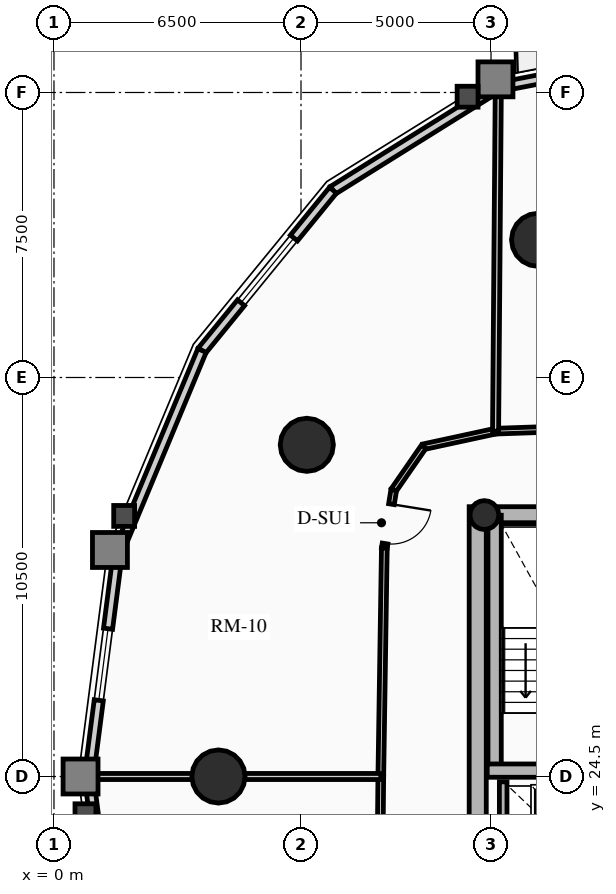
"""IFC4 building model, lengths in metres.
Left out: names, types, materials, properties, quantities, classifications, styles, units other than length and angle.
Written with IfcOpenShell. Run it as: python <this file> out.ifc"""

import sys

from ifc_helpers import new_model, si_unit, direction, frame, frame_2d, origin, origin_2d, place, context, subcontext, project, spatial, rectangle, circle, hollow_circle, extrude, source, transform, mapped, element, fill, save


model = new_model("IFC4")
c1 = context("Model", 3, precision=1e-05, world=origin(), true_north=direction((0.0, 1.0)))
c2 = subcontext(c1, "Body", "Model", "MODEL_VIEW")
j1 = project(units=[si_unit("LENGTHUNIT", "METRE"), si_unit("PLANEANGLEUNIT", "RADIAN")], contexts=[c1])
p1 = place(None, origin())
s1 = spatial("IfcSite", under=j1, at=p1, CompositionType="ELEMENT")
p2 = place(p1, origin())
s2 = spatial("IfcBuilding", under=s1, at=p2, CompositionType="ELEMENT")
p3 = place(p2, frame((0.0, 0.0, 75.97)))
s3 = spatial("IfcBuildingStorey", under=s2, at=p3, CompositionType="ELEMENT", Elevation=75.97)
p4 = place(p3, frame((11.15, 17.4, 0.0), z_axis=(0.0, 0.0, 1.0), x_axis=(0.0, 1.0, 0.0)))
e1 = element("IfcWall", 1, at=p4, inside=s3, PredefinedType="SHEAR", context=c2, shape_type="SweptSolid", body=[
    extrude(rectangle(XDim=14.2, YDim=0.45, at=frame_2d((7.1, 0.0))), origin(), (0.0, 0.0, 1.0), 2.91),
])
p5 = place(p3, frame((11.15, 31.375, 0.0), z_axis=(0.0, 0.0, 1.0), x_axis=(1.0, 0.0, 0.0)))
e2 = element("IfcWall", 2, at=p5, inside=s3, PredefinedType="SHEAR", context=c2, shape_type="SweptSolid", body=[
    extrude(rectangle(XDim=10.7, YDim=0.45, at=frame_2d((5.35, 0.0))), origin(), (0.0, 0.0, 1.0), 2.91),
])
m1 = source(origin(), c2, "Body", "SweptSolid", [
    extrude(rectangle(XDim=1.5, YDim=2.02, at=frame_2d((0.75, 1.01))), frame((0.0, 0.235, 0.0), z_axis=(0.0, -1.0, 0.0), x_axis=(1.0, 0.0, 0.0)), (0.0, 0.0, 1.0), 0.47),
])
p6 = place(p5, frame((4.6, 0.0, 0.0)))
e3 = element("IfcOpeningElement", 3, at=p6, cuts=e2, PredefinedType="OPENING", context=c2, shape_type="MappedRepresentation", body=[
    mapped(m1, transform((0.0, 0.0, 0.0), x_axis=(1.0, 0.0, 0.0), y_axis=(0.0, 1.0, 0.0), z_axis=(0.0, 0.0, 1.0), scale=1.0)),
])
p7 = place(p3, frame((11.595, 24.655, 0.0), z_axis=(0.0, 0.0, 1.0), x_axis=(0.0, 1.0, 0.0)))
e4 = element("IfcWall", 4, at=p7, inside=s3, PredefinedType="SHEAR", context=c2, shape_type="SweptSolid", body=[
    extrude(rectangle(XDim=6.72, YDim=0.35, at=frame_2d((3.36, 0.0))), origin(), (0.0, 0.0, 1.0), 2.91),
])
p8 = place(p3, frame((11.4, 24.655, 0.0), z_axis=(0.0, 0.0, 1.0), x_axis=(1.0, 0.0, 0.0)))
e5 = element("IfcWall", 5, at=p8, inside=s3, PredefinedType="SHEAR", context=c2, shape_type="SweptSolid", body=[
    extrude(rectangle(XDim=3.285, YDim=0.35, at=frame_2d((1.643, 0.0))), origin(), (0.0, 0.0, 1.0), 2.91),
])
p9 = place(p3, frame((11.325, 31.38, 0.0), z_axis=(0.0, 0.0, 1.0), x_axis=(1.0, 0.0, 0.0)))
e6 = element("IfcColumn", 6, at=p9, inside=s3, PredefinedType="COLUMN", context=c2, shape_type="SweptSolid", body=[
    extrude(hollow_circle(Radius=0.38, WallThickness=0.032, at=origin_2d()), origin(), (0.0, 0.0, 1.0), 2.91),
])
for number, where, z_axis, x_axis in (
    (7, (12.739, 38.623, 0.0), (0.0, 0.0, 1.0), (1.0, 0.0, 0.0)),
    (8, (6.653, 33.229, 0.0), (0.0, 0.0, 1.0), (1.0, 0.0, 0.0)),
    (9, (4.328, 24.5, 0.0), (0.0, 0.0, 1.0), (1.0, 0.0, 0.0)),
):
    element("IfcColumn", number, at=place(p3, frame(where, z_axis=z_axis, x_axis=x_axis)), inside=s3, PredefinedType="USERDEFINED", context=c2, shape_type="SweptSolid", body=[
        extrude(circle(Radius=0.7, at=origin_2d()), origin(), (0.0, 0.0, 1.0), 2.91),
    ])
p10 = place(p3, frame((11.685, 42.637, 0.0), z_axis=(0.0, 0.0, 1.0), x_axis=(0.981723785992, 0.190311344954, 0.0)))
e10 = element("IfcWall", 10, at=p10, inside=s3, PredefinedType="SOLIDWALL", context=c2, shape_type="SweptSolid", body=[
    extrude(rectangle(XDim=4.904, YDim=0.24, at=frame_2d((2.452, 0.0))), origin(), (0.0, 0.0, 1.0), 2.179),
])
m2 = source(origin(), c2, "Body", "SweptSolid", [
    extrude(rectangle(XDim=1.15, YDim=2.005, at=frame_2d((0.575, 1.002))), frame((0.0, 0.13, 0.0), z_axis=(0.0, -1.0, 0.0), x_axis=(1.0, 0.0, 0.0)), (0.0, 0.0, 1.0), 0.26),
])
p11 = place(p10, frame((1.877, 0.0, 0.0)))
e11 = element("IfcOpeningElement", 11, at=p11, cuts=e10, PredefinedType="OPENING", context=c2, shape_type="MappedRepresentation", body=[
    mapped(m2, transform((0.0, 0.0, 0.0), x_axis=(1.0, 0.0, 0.0), y_axis=(0.0, 1.0, 0.0), z_axis=(0.0, 0.0, 1.0), scale=1.0)),
])
p12 = place(p3, frame((7.342, 39.928, 0.0), z_axis=(0.0, 0.0, 1.0), x_axis=(0.848520380187, 0.529162701263, 0.0)))
e12 = element("IfcWall", 12, at=p12, inside=s3, PredefinedType="SOLIDWALL", context=c2, shape_type="SweptSolid", body=[
    extrude(rectangle(XDim=5.119, YDim=0.24, at=frame_2d((2.56, 0.0))), origin(), (0.0, 0.0, 1.0), 2.179),
])
p13 = place(p3, frame((3.895, 35.709, 0.0), z_axis=(0.0, 0.0, 1.0), x_axis=(0.632700781152, 0.77439635945, 0.0)))
e13 = element("IfcWall", 13, at=p13, inside=s3, PredefinedType="SOLIDWALL", context=c2, shape_type="SweptSolid", body=[
    extrude(rectangle(XDim=5.448, YDim=0.24, at=frame_2d((2.724, 0.0))), origin(), (0.0, 0.0, 1.0), 2.179),
])
m3 = source(origin(), c2, "Body", "SweptSolid", [
    extrude(rectangle(XDim=2.2, YDim=1.35, at=frame_2d((1.1, 0.675))), frame((0.0, 0.13, 0.0), z_axis=(0.0, -1.0, 0.0), x_axis=(1.0, 0.0, 0.0)), (0.0, 0.0, 1.0), 0.26),
])
p14 = place(p13, frame((1.624, 0.0, 0.65)))
e14 = element("IfcOpeningElement", 14, at=p14, cuts=e13, PredefinedType="OPENING", context=c2, shape_type="MappedRepresentation", body=[
    mapped(m3, transform((0.0, 0.0, 0.0), x_axis=(1.0, 0.0, 0.0), y_axis=(0.0, 1.0, 0.0), z_axis=(0.0, 0.0, 1.0), scale=1.0)),
])
p15 = place(p3, frame((1.682, 30.393, 0.0), z_axis=(0.0, 0.0, 1.0), x_axis=(0.384344417632, 0.923189779317, 0.0)))
e15 = element("IfcWall", 15, at=p15, inside=s3, PredefinedType="SOLIDWALL", context=c2, shape_type="SweptSolid", body=[
    extrude(rectangle(XDim=5.758, YDim=0.24, at=frame_2d((2.879, 0.0))), origin(), (0.0, 0.0, 1.0), 2.179),
])
p16 = place(p3, frame((0.919, 24.5, 0.0), z_axis=(0.0, 0.0, 1.0), x_axis=(0.128351991996, 0.991728675672, 0.0)))
e16 = element("IfcWall", 16, at=p16, inside=s3, PredefinedType="SOLIDWALL", context=c2, shape_type="SweptSolid", body=[
    extrude(rectangle(XDim=5.942, YDim=0.24, at=frame_2d((2.971, 0.0))), origin(), (0.0, 0.0, 1.0), 2.179),
])
m4 = source(origin(), c2, "Body", "SweptSolid", [
    extrude(rectangle(XDim=1.9, YDim=1.35, at=frame_2d((0.95, 0.675))), frame((0.0, 0.13, 0.0), z_axis=(0.0, -1.0, 0.0), x_axis=(1.0, 0.0, 0.0)), (0.0, 0.0, 1.0), 0.26),
])
p17 = place(p16, frame((2.021, 0.0, 0.65)))
e17 = element("IfcOpeningElement", 17, at=p17, cuts=e16, PredefinedType="OPENING", context=c2, shape_type="MappedRepresentation", body=[
    mapped(m4, transform((0.0, 0.0, 0.0), x_axis=(1.0, 0.0, 0.0), y_axis=(0.0, 1.0, 0.0), z_axis=(0.0, 0.0, 1.0), scale=1.0)),
])
p18 = place(p3, frame((1.682, 18.607, 0.0), z_axis=(0.0, 0.0, 1.0), x_axis=(-0.128351991996, 0.991728675672, 0.0)))
e18 = element("IfcWall", 18, at=p18, inside=s3, PredefinedType="SOLIDWALL", context=c2, shape_type="SweptSolid", body=[
    extrude(rectangle(XDim=5.942, YDim=0.24, at=frame_2d((2.971, 0.0))), origin(), (0.0, 0.0, 1.0), 2.179),
])
p19 = place(p3, frame((11.82, 21.92, 0.0), z_axis=(0.0, 0.0, 1.0), x_axis=(0.0, 1.0, 0.0)))
e19 = element("IfcWall", 19, at=p19, inside=s3, PredefinedType="SHEAR", context=c2, shape_type="SweptSolid", body=[
    extrude(rectangle(XDim=2.44, YDim=0.2, at=frame_2d((1.22, 0.0))), origin(), (0.0, 0.0, 1.0), 2.91),
])
p20 = place(p3, frame((18.143, 33.81, 0.0), z_axis=(0.0, 0.0, 1.0), x_axis=(-0.999423023908, -0.033964971394, 0.0)))
e20 = element("IfcWall", 20, at=p20, inside=s3, PredefinedType="PARTITIONING", context=c2, shape_type="SweptSolid", body=[
    extrude(rectangle(XDim=6.527, YDim=0.15, at=frame_2d((3.263, 0.0))), origin(), (0.0, 0.0, 1.0), 2.225),
])
p21 = place(p3, frame((11.62, 33.588, 0.0), z_axis=(0.0, 0.0, 1.0), x_axis=(-0.977392314559, -0.211433827571, 0.0)))
e21 = element("IfcWall", 21, at=p21, inside=s3, PredefinedType="PARTITIONING", context=c2, shape_type="SweptSolid", body=[
    extrude(rectangle(XDim=1.934, YDim=0.15, at=frame_2d((0.967, 0.0))), origin(), (0.0, 0.0, 1.0), 2.225),
])
p22 = place(p3, frame((9.729, 33.179, 0.0), z_axis=(0.0, 0.0, 1.0), x_axis=(-0.569155068352, -0.822230203878, 0.0)))
e22 = element("IfcWall", 22, at=p22, inside=s3, PredefinedType="PARTITIONING", context=c2, shape_type="SweptSolid", body=[
    extrude(rectangle(XDim=1.387, YDim=0.15, at=frame_2d((0.694, 0.0))), origin(), (0.0, 0.0, 1.0), 2.225),
])
p23 = place(p3, frame((8.94, 32.038, 0.0), z_axis=(0.0, 0.0, 1.0), x_axis=(-0.159917336462, -0.987130409571, 0.0)))
e23 = element("IfcWall", 23, at=p23, inside=s3, PredefinedType="PARTITIONING", context=c2, shape_type="SweptSolid", body=[
    extrude(rectangle(XDim=1.547, YDim=0.15, at=frame_2d((0.773, 0.0))), origin(), (0.0, 0.0, 1.0), 2.225),
])
m5 = source(origin(), c2, "Body", "SweptSolid", [
    extrude(rectangle(XDim=1.05, YDim=2.015, at=frame_2d((0.525, 1.007))), frame((0.0, 0.085, 0.0), z_axis=(0.0, -1.0, 0.0), x_axis=(1.0, 0.0, 0.0)), (0.0, 0.0, 1.0), 0.17),
])
p24 = place(p23, frame((0.377, 0.0, 0.0)))
e24 = element("IfcOpeningElement", 24, at=p24, cuts=e23, PredefinedType="OPENING", context=c2, shape_type="MappedRepresentation", body=[
    mapped(m5, transform((0.0, 0.0, 0.0), x_axis=(1.0, 0.0, 0.0), y_axis=(0.0, 1.0, 0.0), z_axis=(0.0, 0.0, 1.0), scale=1.0)),
])
p25 = place(p3, frame((8.693, 30.512, 0.0), z_axis=(0.0, 0.0, 1.0), x_axis=(-0.015389665197, -0.99988157209, 0.0)))
e25 = element("IfcWall", 25, at=p25, inside=s3, PredefinedType="PARTITIONING", context=c2, shape_type="SweptSolid", body=[
    extrude(rectangle(XDim=6.012, YDim=0.15, at=frame_2d((3.006, 0.0))), origin(), (0.0, 0.0, 1.0), 2.655),
])
p26 = place(p3, frame((8.6, 24.5, 0.0), z_axis=(0.0, 0.0, 1.0), x_axis=(-0.010076760723, -0.999949228158, 0.0)))
e26 = element("IfcWall", 26, at=p26, inside=s3, PredefinedType="PARTITIONING", context=c2, shape_type="SweptSolid", body=[
    extrude(rectangle(XDim=6.13, YDim=0.15, at=frame_2d((3.065, 0.0))), origin(), (0.0, 0.0, 1.0), 2.225),
])
p27 = place(p3, frame((11.62, 33.588, 0.0), z_axis=(0.0, 0.0, 1.0), x_axis=(0.007921667836, 0.999968623097, 0.0)))
e27 = element("IfcWall", 27, at=p27, inside=s3, PredefinedType="PARTITIONING", context=c2, shape_type="SweptSolid", body=[
    extrude(rectangle(XDim=9.03, YDim=0.16, at=frame_2d((4.515, 0.0))), origin(), (0.0, 0.0, 1.0), 2.179),
])
p28 = place(p3, frame((8.6, 24.5, 0.0), z_axis=(0.0, 0.0, 1.0), x_axis=(-1.0, 0.0, 0.0)))
e28 = element("IfcWall", 28, at=p28, inside=s3, PredefinedType="PARTITIONING", context=c2, shape_type="SweptSolid", body=[
    extrude(rectangle(XDim=7.661, YDim=0.16, at=frame_2d((3.831, 0.0))), origin(), (0.0, 0.0, 1.0), 2.179),
])
m6 = source(origin(), c2, "Body", "SweptSolid", [
    extrude(rectangle(XDim=2.2, YDim=1.35, at=frame_2d((1.1, 0.675))), frame((0.0, 0.03, 0.0), z_axis=(0.0, -1.0, 0.0), x_axis=(1.0, 0.0, 0.0)), (0.0, 0.0, 1.0), 0.06),
])
p29 = place(p14, origin())
e29 = element("IfcWindow", 29, at=p29, inside=s3, PartitioningType="DOUBLE_PANEL_VERTICAL", PredefinedType="WINDOW", context=c2, shape_type="MappedRepresentation", body=[
    mapped(m6, transform((0.0, 0.0, 0.0), x_axis=(1.0, 0.0, 0.0), y_axis=(0.0, 1.0, 0.0), z_axis=(0.0, 0.0, 1.0), scale=1.0)),
])
fill(e14, e29)
m7 = source(origin(), c2, "Body", "SweptSolid", [
    extrude(rectangle(XDim=1.9, YDim=1.35, at=frame_2d((0.95, 0.675))), frame((0.0, 0.03, 0.0), z_axis=(0.0, -1.0, 0.0), x_axis=(1.0, 0.0, 0.0)), (0.0, 0.0, 1.0), 0.06),
])
p30 = place(p17, origin())
e30 = element("IfcWindow", 30, at=p30, inside=s3, PartitioningType="DOUBLE_PANEL_VERTICAL", PredefinedType="WINDOW", context=c2, shape_type="MappedRepresentation", body=[
    mapped(m7, transform((0.0, 0.0, 0.0), x_axis=(1.0, 0.0, 0.0), y_axis=(0.0, 1.0, 0.0), z_axis=(0.0, 0.0, 1.0), scale=1.0)),
])
fill(e17, e30)
m8 = source(origin(), c2, "Body", "SweptSolid", [
    extrude(rectangle(XDim=1.05, YDim=2.015, at=frame_2d((0.525, 1.007))), frame((0.0, 0.025, 0.0), z_axis=(0.0, -1.0, 0.0), x_axis=(1.0, 0.0, 0.0)), (0.0, 0.0, 1.0), 0.05),
])
p31 = place(p24, origin())
e31 = element("IfcDoor", 31, at=p31, inside=s3, OperationType="SINGLE_SWING_LEFT", PredefinedType="DOOR", context=c2, shape_type="MappedRepresentation", body=[
    mapped(m8, transform((0.0, 0.0, 0.0), x_axis=(1.0, 0.0, 0.0), y_axis=(0.0, 1.0, 0.0), z_axis=(0.0, 0.0, 1.0), scale=1.0)),
])
fill(e24, e31)
save(model, sys.argv[1])
